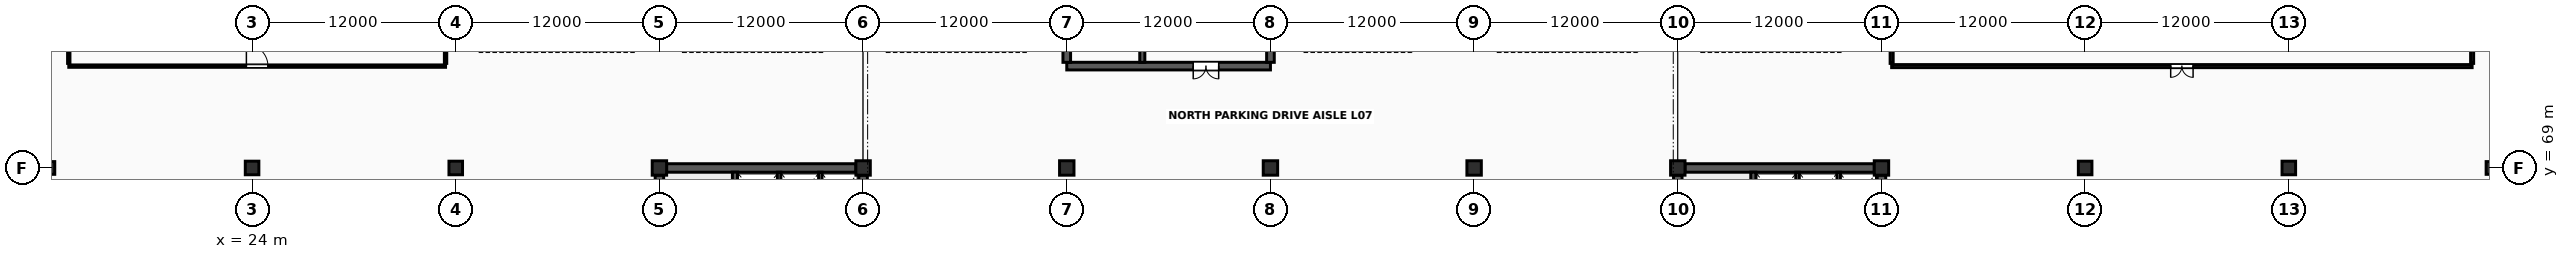
"""IFC4 building model, lengths in metres.
Left out: names, types, materials, properties, quantities, classifications, styles, units other than length and angle.
Written with IfcOpenShell. Run it as: python <this file> out.ifc"""

import sys

from ifc_helpers import new_model, si_unit, direction, frame, frame_2d, origin, origin_2d, place, context, subcontext, project, spatial, rectangle, extrude, element, fill, save


model = new_model("IFC4")
c1 = context("Model", 3, precision=1e-05, world=origin(), true_north=direction((0.0, 1.0)))
c2 = subcontext(c1, "Body", "Model", "MODEL_VIEW")
j1 = project(units=[si_unit("LENGTHUNIT", "METRE"), si_unit("PLANEANGLEUNIT", "RADIAN")], contexts=[c1])
p1 = place(None, origin())
s1 = spatial("IfcSite", under=j1, at=p1, CompositionType="ELEMENT")
p2 = place(p1, origin())
s2 = spatial("IfcBuilding", under=s1, at=p2, CompositionType="ELEMENT")
p3 = place(p2, frame((0.0, 0.0, 28.6)))
s3 = spatial("IfcBuildingStorey", under=s2, at=p3, CompositionType="ELEMENT", Elevation=28.6)
p4 = place(p3, frame((12.0, 69.0, 0.0), z_axis=(0.0, 0.0, 1.0), x_axis=(1.0, 0.0, 0.0)))
e1 = element("IfcColumn", 1, at=p4, inside=s3, PredefinedType="COLUMN", context=c2, shape_type="SweptSolid", body=[
    extrude(rectangle(XDim=0.75, YDim=0.75, at=origin_2d()), origin(), (0.0, 0.0, 1.0), 3.8),
])
for number, where, z_axis, x_axis in (
    (2, (24.0, 69.0, 0.0), (0.0, 0.0, 1.0), (1.0, 0.0, 0.0)),
    (3, (36.0, 69.0, 0.0), (0.0, 0.0, 1.0), (1.0, 0.0, 0.0)),
):
    element("IfcColumn", number, at=place(p3, frame(where, z_axis=z_axis, x_axis=x_axis)), inside=s3, PredefinedType="COLUMN", context=c2, shape_type="SweptSolid", body=[
        extrude(rectangle(XDim=0.8, YDim=0.8, at=origin_2d()), origin(), (0.0, 0.0, 1.0), 3.8),
    ])
for number, where, z_axis, x_axis in (
    (4, (48.0, 69.0, 0.0), (0.0, 0.0, 1.0), (1.0, 0.0, 0.0)),
    (5, (60.0, 69.0, 0.0), (0.0, 0.0, 1.0), (1.0, 0.0, 0.0)),
    (6, (72.0, 69.0, 0.0), (0.0, 0.0, 1.0), (1.0, 0.0, 0.0)),
    (7, (84.0, 69.0, 0.0), (0.0, 0.0, 1.0), (1.0, 0.0, 0.0)),
    (8, (96.0, 69.0, 0.0), (0.0, 0.0, 1.0), (1.0, 0.0, 0.0)),
    (9, (108.0, 69.0, 0.0), (0.0, 0.0, 1.0), (1.0, 0.0, 0.0)),
    (10, (120.0, 69.0, 0.0), (0.0, 0.0, 1.0), (1.0, 0.0, 0.0)),
):
    element("IfcColumn", number, at=place(p3, frame(where, z_axis=z_axis, x_axis=x_axis)), inside=s3, PredefinedType="COLUMN", context=c2, shape_type="SweptSolid", body=[
        extrude(rectangle(XDim=0.85, YDim=0.85, at=origin_2d()), origin(), (0.0, 0.0, 1.0), 3.8),
    ])
for number, where, z_axis, x_axis in (
    (11, (132.0, 69.0, 0.0), (0.0, 0.0, 1.0), (1.0, 0.0, 0.0)),
    (12, (144.0, 69.0, 0.0), (0.0, 0.0, 1.0), (1.0, 0.0, 0.0)),
):
    element("IfcColumn", number, at=place(p3, frame(where, z_axis=z_axis, x_axis=x_axis)), inside=s3, PredefinedType="COLUMN", context=c2, shape_type="SweptSolid", body=[
        extrude(rectangle(XDim=0.8, YDim=0.8, at=origin_2d()), origin(), (0.0, 0.0, 1.0), 3.8),
    ])
p5 = place(p3, frame((156.0, 69.0, 0.0), z_axis=(0.0, 0.0, 1.0), x_axis=(1.0, 0.0, 0.0)))
e13 = element("IfcColumn", 13, at=p5, inside=s3, PredefinedType="COLUMN", context=c2, shape_type="SweptSolid", body=[
    extrude(rectangle(XDim=0.75, YDim=0.75, at=origin_2d()), origin(), (0.0, 0.0, 1.0), 3.8),
])
for number, where, z_axis, x_axis in (
    (14, (48.422, 69.0, 0.0), (0.0, 0.0, 1.0), (1.0, 0.0, 0.0)),
    (15, (48.0, 57.422, 0.0), (0.0, 0.0, 1.0), (0.0, 1.0, 0.0)),
    (16, (60.0, 57.422, 0.0), (0.0, 0.0, 1.0), (0.0, 1.0, 0.0)),
):
    element("IfcWall", number, at=place(p3, frame(where, z_axis=z_axis, x_axis=x_axis)), inside=s3, PredefinedType="SHEAR", context=c2, shape_type="SweptSolid", body=[
        extrude(rectangle(XDim=11.156, YDim=0.5, at=frame_2d((5.578, 0.0))), origin(), (0.0, 0.0, 1.0), 3.553),
    ])
p6 = place(p3, frame((52.45, 57.247, 0.0), z_axis=(0.0, 0.0, 1.0), x_axis=(0.0, 1.0, 0.0)))
e17 = element("IfcWall", 17, at=p6, inside=s3, PredefinedType="SHEAR", context=c2, shape_type="SweptSolid", body=[
    extrude(rectangle(XDim=11.506, YDim=0.3, at=frame_2d((5.753, 0.0))), origin(), (0.0, 0.0, 1.0), 3.553),
])
p7 = place(p6, frame((0.9, 0.0, 0.0)))
e18 = element("IfcOpeningElement", 18, at=p7, cuts=e17, PredefinedType="OPENING", context=c2, shape_type="SweptSolid", body=[
    extrude(rectangle(XDim=1.1, YDim=2.2, at=frame_2d((0.55, 1.1))), frame((0.0, 0.165, 0.0), z_axis=(0.0, -1.0, 0.0), x_axis=(1.0, 0.0, 0.0)), (0.0, 0.0, 1.0), 0.33),
])
for number, where, z_axis, x_axis in (
    (19, (55.05, 65.92, 0.0), (0.0, 0.0, 1.0), (0.0, 1.0, 0.0)),
    (20, (57.48, 65.92, 0.0), (0.0, 0.0, 1.0), (0.0, 1.0, 0.0)),
):
    element("IfcWall", number, at=place(p3, frame(where, z_axis=z_axis, x_axis=x_axis)), inside=s3, PredefinedType="SOLIDWALL", context=c2, shape_type="SweptSolid", body=[
        extrude(rectangle(XDim=2.83, YDim=0.2, at=frame_2d((1.415, 0.0))), origin(), (0.0, 0.0, 1.0), 3.543),
    ])
for number, where, z_axis, x_axis in (
    (21, (108.422, 69.0, 0.0), (0.0, 0.0, 1.0), (1.0, 0.0, 0.0)),
    (22, (108.0, 57.422, 0.0), (0.0, 0.0, 1.0), (0.0, 1.0, 0.0)),
    (23, (120.0, 57.422, 0.0), (0.0, 0.0, 1.0), (0.0, 1.0, 0.0)),
):
    element("IfcWall", number, at=place(p3, frame(where, z_axis=z_axis, x_axis=x_axis)), inside=s3, PredefinedType="SHEAR", context=c2, shape_type="SweptSolid", body=[
        extrude(rectangle(XDim=11.156, YDim=0.5, at=frame_2d((5.578, 0.0))), origin(), (0.0, 0.0, 1.0), 3.553),
    ])
p8 = place(p3, frame((112.45, 57.247, 0.0), z_axis=(0.0, 0.0, 1.0), x_axis=(0.0, 1.0, 0.0)))
e24 = element("IfcWall", 24, at=p8, inside=s3, PredefinedType="SHEAR", context=c2, shape_type="SweptSolid", body=[
    extrude(rectangle(XDim=11.506, YDim=0.3, at=frame_2d((5.753, 0.0))), origin(), (0.0, 0.0, 1.0), 3.553),
])
p9 = place(p8, frame((0.9, 0.0, 0.0)))
e25 = element("IfcOpeningElement", 25, at=p9, cuts=e24, PredefinedType="OPENING", context=c2, shape_type="SweptSolid", body=[
    extrude(rectangle(XDim=1.1, YDim=2.2, at=frame_2d((0.55, 1.1))), frame((0.0, 0.165, 0.0), z_axis=(0.0, -1.0, 0.0), x_axis=(1.0, 0.0, 0.0)), (0.0, 0.0, 1.0), 0.33),
])
for number, where, z_axis, x_axis in (
    (26, (115.05, 65.92, 0.0), (0.0, 0.0, 1.0), (0.0, 1.0, 0.0)),
    (27, (117.48, 65.92, 0.0), (0.0, 0.0, 1.0), (0.0, 1.0, 0.0)),
):
    element("IfcWall", number, at=place(p3, frame(where, z_axis=z_axis, x_axis=x_axis)), inside=s3, PredefinedType="SOLIDWALL", context=c2, shape_type="SweptSolid", body=[
        extrude(rectangle(XDim=2.83, YDim=0.2, at=frame_2d((1.415, 0.0))), origin(), (0.0, 0.0, 1.0), 3.543),
    ])
p10 = place(p3, frame((72.0, 75.0, 0.0), z_axis=(0.0, 0.0, 1.0), x_axis=(1.0, 0.0, 0.0)))
e28 = element("IfcWall", 28, at=p10, inside=s3, PredefinedType="SHEAR", context=c2, shape_type="SweptSolid", body=[
    extrude(rectangle(XDim=12.0, YDim=0.45, at=frame_2d((6.0, 0.0))), origin(), (0.0, 0.0, 1.0), 3.553),
])
p11 = place(p10, frame((7.45, 0.0, 0.0)))
e29 = element("IfcOpeningElement", 29, at=p11, cuts=e28, PredefinedType="OPENING", context=c2, shape_type="SweptSolid", body=[
    extrude(rectangle(XDim=1.5, YDim=2.25, at=frame_2d((0.75, 1.125))), frame((0.0, 0.24, 0.0), z_axis=(0.0, -1.0, 0.0), x_axis=(1.0, 0.0, 0.0)), (0.0, 0.0, 1.0), 0.48),
])
for number, where, z_axis, x_axis in (
    (30, (72.0, 75.222, 0.0), (0.0, 0.0, 1.0), (0.0, 1.0, 0.0)),
    (31, (84.0, 75.222, 0.0), (0.0, 0.0, 1.0), (0.0, 1.0, 0.0)),
):
    element("IfcWall", number, at=place(p3, frame(where, z_axis=z_axis, x_axis=x_axis)), inside=s3, PredefinedType="SHEAR", context=c2, shape_type="SweptSolid", body=[
        extrude(rectangle(XDim=11.381, YDim=0.45, at=frame_2d((5.69, 0.0))), origin(), (0.0, 0.0, 1.0), 3.553),
    ])
p12 = place(p3, frame((76.45, 75.222, 0.0), z_axis=(0.0, 0.0, 1.0), x_axis=(0.0, 1.0, 0.0)))
e32 = element("IfcWall", 32, at=p12, inside=s3, PredefinedType="SHEAR", context=c2, shape_type="SweptSolid", body=[
    extrude(rectangle(XDim=11.556, YDim=0.3, at=frame_2d((5.778, 0.0))), origin(), (0.0, 0.0, 1.0), 3.553),
])
p13 = place(p12, frame((0.9, 0.0, 0.0)))
e33 = element("IfcOpeningElement", 33, at=p13, cuts=e32, PredefinedType="OPENING", context=c2, shape_type="SweptSolid", body=[
    extrude(rectangle(XDim=1.1, YDim=2.2, at=frame_2d((0.55, 1.1))), frame((0.0, 0.165, 0.0), z_axis=(0.0, -1.0, 0.0), x_axis=(1.0, 0.0, 0.0)), (0.0, 0.0, 1.0), 0.33),
])
p14 = place(p3, frame((120.6, 75.0, 0.0), z_axis=(0.0, 0.0, 1.0), x_axis=(1.0, 0.0, 0.0)))
e34 = element("IfcWall", 34, at=p14, inside=s3, PredefinedType="SOLIDWALL", context=c2, shape_type="SweptSolid", body=[
    extrude(rectangle(XDim=34.2, YDim=0.18, at=frame_2d((17.1, 0.0))), origin(), (0.0, 0.0, 1.0), 2.64),
])
p15 = place(p14, frame((16.44, 0.0, 0.0)))
e35 = element("IfcOpeningElement", 35, at=p15, cuts=e34, PredefinedType="OPENING", context=c2, shape_type="SweptSolid", body=[
    extrude(rectangle(XDim=1.32, YDim=2.26, at=frame_2d((0.66, 1.13))), frame((0.0, 0.105, 0.0), z_axis=(0.0, -1.0, 0.0), x_axis=(1.0, 0.0, 0.0)), (0.0, 0.0, 1.0), 0.21),
])
for number, where, z_axis, x_axis in (
    (36, (120.6, 75.16, 0.0), (0.0, 0.0, 1.0), (0.0, 1.0, 0.0)),
    (37, (154.8, 75.16, 0.0), (0.0, 0.0, 1.0), (0.0, 1.0, 0.0)),
):
    element("IfcWall", number, at=place(p3, frame(where, z_axis=z_axis, x_axis=x_axis)), inside=s3, PredefinedType="SOLIDWALL", context=c2, shape_type="SweptSolid", body=[
        extrude(rectangle(XDim=16.68, YDim=0.18, at=frame_2d((8.34, 0.0))), origin(), (0.0, 0.0, 1.0), 2.64),
    ])
p16 = place(p3, frame((13.2, 75.0, 0.0), z_axis=(0.0, 0.0, 1.0), x_axis=(1.0, 0.0, 0.0)))
e38 = element("IfcWall", 38, at=p16, inside=s3, PredefinedType="PARTITIONING", context=c2, shape_type="SweptSolid", body=[
    extrude(rectangle(XDim=22.2, YDim=0.14, at=frame_2d((11.1, 0.0))), origin(), (0.0, 0.0, 1.0), 2.64),
])
p17 = place(p16, frame((10.465, 0.0, 0.0)))
e39 = element("IfcOpeningElement", 39, at=p17, cuts=e38, PredefinedType="OPENING", context=c2, shape_type="SweptSolid", body=[
    extrude(rectangle(XDim=1.27, YDim=2.27, at=frame_2d((0.635, 1.135))), frame((0.0, 0.085, 0.0), z_axis=(0.0, -1.0, 0.0), x_axis=(1.0, 0.0, 0.0)), (0.0, 0.0, 1.0), 0.17),
])
for number, where, z_axis, x_axis in (
    (40, (13.2, 75.16, 0.0), (0.0, 0.0, 1.0), (0.0, 1.0, 0.0)),
    (41, (35.4, 75.16, 0.0), (0.0, 0.0, 1.0), (0.0, 1.0, 0.0)),
):
    element("IfcWall", number, at=place(p3, frame(where, z_axis=z_axis, x_axis=x_axis)), inside=s3, PredefinedType="PARTITIONING", context=c2, shape_type="SweptSolid", body=[
        extrude(rectangle(XDim=16.68, YDim=0.14, at=frame_2d((8.34, 0.0))), origin(), (0.0, 0.0, 1.0), 2.64),
    ])
p18 = place(p11, origin())
e42 = element("IfcDoor", 42, at=p18, inside=s3, OperationType="DOUBLE_DOOR_SINGLE_SWING", PredefinedType="DOOR", context=c2, shape_type="SweptSolid", body=[
    extrude(rectangle(XDim=1.5, YDim=2.25, at=frame_2d((0.75, 1.125))), frame((0.0, 0.025, 0.0), z_axis=(0.0, -1.0, 0.0), x_axis=(1.0, 0.0, 0.0)), (0.0, 0.0, 1.0), 0.05),
])
fill(e29, e42)
p19 = place(p15, origin())
e43 = element("IfcDoor", 43, at=p19, inside=s3, OperationType="DOUBLE_DOOR_SINGLE_SWING", PredefinedType="DOOR", context=c2, shape_type="SweptSolid", body=[
    extrude(rectangle(XDim=1.32, YDim=2.26, at=frame_2d((0.66, 1.13))), frame((0.0, 0.025, 0.0), z_axis=(0.0, -1.0, 0.0), x_axis=(1.0, 0.0, 0.0)), (0.0, 0.0, 1.0), 0.05),
])
fill(e35, e43)
p20 = place(p17, origin())
e44 = element("IfcDoor", 44, at=p20, inside=s3, OperationType="SINGLE_SWING_LEFT", PredefinedType="DOOR", context=c2, shape_type="SweptSolid", body=[
    extrude(rectangle(XDim=1.27, YDim=2.27, at=frame_2d((0.635, 1.135))), frame((0.0, 0.025, 0.0), z_axis=(0.0, -1.0, 0.0), x_axis=(1.0, 0.0, 0.0)), (0.0, 0.0, 1.0), 0.05),
])
fill(e39, e44)
save(model, sys.argv[1])
